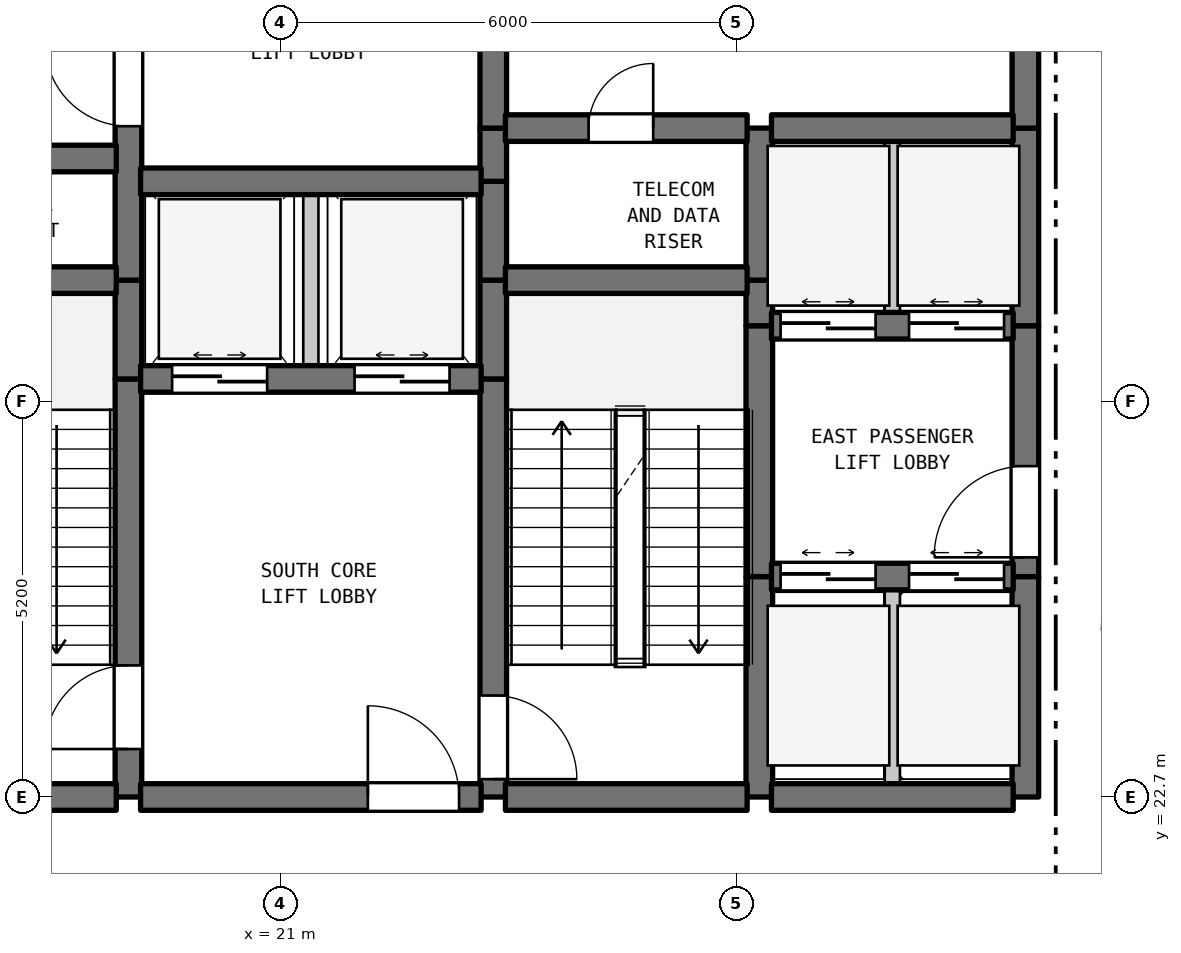
"""IFC4 building model, lengths in metres.
Left out: names, types, materials, properties, quantities, classifications, styles, units other than length and angle.
Written with IfcOpenShell. Run it as: python <this file> out.ifc"""

import sys

from ifc_helpers import new_model, si_unit, direction, frame, frame_2d, origin, place, context, subcontext, project, spatial, rectangle, extrude, element, fill, save


model = new_model("IFC4")
c1 = context("Model", 3, precision=1e-05, world=origin(), true_north=direction((0.0, 1.0)))
c2 = subcontext(c1, "Body", "Model", "MODEL_VIEW")
j1 = project(units=[si_unit("LENGTHUNIT", "METRE"), si_unit("PLANEANGLEUNIT", "RADIAN")], contexts=[c1])
p1 = place(None, origin())
s1 = spatial("IfcSite", under=j1, at=p1, CompositionType="ELEMENT")
p2 = place(p1, origin())
s2 = spatial("IfcBuilding", under=s1, at=p2, CompositionType="ELEMENT")
p3 = place(p2, frame((0.0, 0.0, 159.4)))
s3 = spatial("IfcBuildingStorey", under=s2, at=p3, CompositionType="ELEMENT", Elevation=159.4)
p4 = place(p3, frame((19.0, 22.7, 0.0), z_axis=(0.0, 0.0, 1.0), x_axis=(0.0, 1.0, 0.0)))
e1 = element("IfcWall", 1, at=p4, inside=s3, PredefinedType="SHEAR", context=c2, shape_type="SweptSolid", body=[
    extrude(rectangle(XDim=5.5, YDim=0.35, at=frame_2d((2.75, 0.0))), origin(), (0.0, 0.0, 1.0), 4.89),
])
p5 = place(p4, frame((0.631, 0.0, 0.0)))
e2 = element("IfcOpeningElement", 2, at=p5, cuts=e1, PredefinedType="OPENING", context=c2, shape_type="SweptSolid", body=[
    extrude(rectangle(XDim=1.1, YDim=2.15, at=frame_2d((0.55, 1.075))), frame((0.0, 0.185, 0.0), z_axis=(0.0, -1.0, 0.0), x_axis=(1.0, 0.0, 0.0)), (0.0, 0.0, 1.0), 0.37),
])
p6 = place(p3, frame((19.0, 28.2, 0.0), z_axis=(0.0, 0.0, 1.0), x_axis=(0.0, 1.0, 0.0)))
e3 = element("IfcWall", 3, at=p6, inside=s3, PredefinedType="SHEAR", context=c2, shape_type="SweptSolid", body=[
    extrude(rectangle(XDim=1.3, YDim=0.35, at=frame_2d((0.65, 0.0))), origin(), (0.0, 0.0, 1.0), 4.89),
])
p7 = place(p3, frame((19.0, 29.5, 0.0), z_axis=(0.0, 0.0, 1.0), x_axis=(0.0, 1.0, 0.0)))
e4 = element("IfcWall", 4, at=p7, inside=s3, PredefinedType="SHEAR", context=c2, shape_type="SweptSolid", body=[
    extrude(rectangle(XDim=5.5, YDim=0.35, at=frame_2d((2.75, 0.0))), origin(), (0.0, 0.0, 1.0), 4.89),
])
p8 = place(p7, frame((2.025, 0.0, 0.0)))
e5 = element("IfcOpeningElement", 5, at=p8, cuts=e4, PredefinedType="OPENING", context=c2, shape_type="SweptSolid", body=[
    extrude(rectangle(XDim=1.1, YDim=2.15, at=frame_2d((0.55, 1.075))), frame((0.0, 0.185, 0.0), z_axis=(0.0, -1.0, 0.0), x_axis=(1.0, 0.0, 0.0)), (0.0, 0.0, 1.0), 0.37),
])
p9 = place(p3, frame((21.4, 28.2, 0.0), z_axis=(0.0, 0.0, 1.0), x_axis=(0.0, 1.0, 0.0)))
e6 = element("IfcWall", 6, at=p9, inside=s3, PredefinedType="STANDARD", context=c2, shape_type="SweptSolid", body=[
    extrude(rectangle(XDim=2.6, YDim=0.2, at=frame_2d((1.3, 0.0))), origin(), (0.0, 0.0, 1.0), 4.89),
])
p10 = place(p3, frame((23.8, 22.7, 0.0), z_axis=(0.0, 0.0, 1.0), x_axis=(0.0, 1.0, 0.0)))
e7 = element("IfcWall", 7, at=p10, inside=s3, PredefinedType="SHEAR", context=c2, shape_type="SweptSolid", body=[
    extrude(rectangle(XDim=5.5, YDim=0.35, at=frame_2d((2.75, 0.0))), origin(), (0.0, 0.0, 1.0), 4.89),
])
p11 = place(p10, frame((0.235, 0.0, 0.0)))
e8 = element("IfcOpeningElement", 8, at=p11, cuts=e7, PredefinedType="OPENING", context=c2, shape_type="SweptSolid", body=[
    extrude(rectangle(XDim=1.1, YDim=2.15, at=frame_2d((0.55, 1.075))), frame((0.0, 0.185, 0.0), z_axis=(0.0, -1.0, 0.0), x_axis=(1.0, 0.0, 0.0)), (0.0, 0.0, 1.0), 0.37),
])
for number, where, z_axis, x_axis in (
    (9, (23.8, 28.2, 0.0), (0.0, 0.0, 1.0), (0.0, 1.0, 0.0)),
    (10, (23.8, 29.5, 0.0), (0.0, 0.0, 1.0), (0.0, 1.0, 0.0)),
):
    element("IfcWall", number, at=place(p3, frame(where, z_axis=z_axis, x_axis=x_axis)), inside=s3, PredefinedType="SHEAR", context=c2, shape_type="SweptSolid", body=[
        extrude(rectangle(XDim=1.3, YDim=0.35, at=frame_2d((0.65, 0.0))), origin(), (0.0, 0.0, 1.0), 4.89),
    ])
p12 = place(p3, frame((23.8, 30.8, 0.0), z_axis=(0.0, 0.0, 1.0), x_axis=(0.0, 1.0, 0.0)))
e11 = element("IfcWall", 11, at=p12, inside=s3, PredefinedType="SHEAR", context=c2, shape_type="SweptSolid", body=[
    extrude(rectangle(XDim=0.7, YDim=0.35, at=frame_2d((0.35, 0.0))), origin(), (0.0, 0.0, 1.0), 4.89),
])
p13 = place(p3, frame((23.8, 31.5, 0.0), z_axis=(0.0, 0.0, 1.0), x_axis=(0.0, 1.0, 0.0)))
e12 = element("IfcWall", 12, at=p13, inside=s3, PredefinedType="SHEAR", context=c2, shape_type="SweptSolid", body=[
    extrude(rectangle(XDim=3.5, YDim=0.35, at=frame_2d((1.75, 0.0))), origin(), (0.0, 0.0, 1.0), 4.89),
])
p14 = place(p13, frame((1.127, 0.0, 0.0)))
e13 = element("IfcOpeningElement", 13, at=p14, cuts=e12, PredefinedType="OPENING", context=c2, shape_type="SweptSolid", body=[
    extrude(rectangle(XDim=1.1, YDim=2.15, at=frame_2d((0.55, 1.075))), frame((0.0, 0.185, 0.0), z_axis=(0.0, -1.0, 0.0), x_axis=(1.0, 0.0, 0.0)), (0.0, 0.0, 1.0), 0.37),
])
p15 = place(p3, frame((27.3, 22.7, 0.0), z_axis=(0.0, 0.0, 1.0), x_axis=(0.0, 1.0, 0.0)))
e14 = element("IfcWall", 14, at=p15, inside=s3, PredefinedType="SHEAR", context=c2, shape_type="SweptSolid", body=[
    extrude(rectangle(XDim=2.9, YDim=0.35, at=frame_2d((1.45, 0.0))), origin(), (0.0, 0.0, 1.0), 4.89),
])
p16 = place(p3, frame((27.3, 25.6, 0.0), z_axis=(0.0, 0.0, 1.0), x_axis=(0.0, 1.0, 0.0)))
e15 = element("IfcWall", 15, at=p16, inside=s3, PredefinedType="SHEAR", context=c2, shape_type="SweptSolid", body=[
    extrude(rectangle(XDim=3.3, YDim=0.35, at=frame_2d((1.65, 0.0))), origin(), (0.0, 0.0, 1.0), 4.89),
])
p17 = place(p3, frame((27.3, 28.9, 0.0), z_axis=(0.0, 0.0, 1.0), x_axis=(0.0, 1.0, 0.0)))
e16 = element("IfcWall", 16, at=p17, inside=s3, PredefinedType="SHEAR", context=c2, shape_type="SweptSolid", body=[
    extrude(rectangle(XDim=0.6, YDim=0.35, at=frame_2d((0.3, 0.0))), origin(), (0.0, 0.0, 1.0), 4.89),
])
p18 = place(p3, frame((27.3, 29.5, 0.0), z_axis=(0.0, 0.0, 1.0), x_axis=(0.0, 1.0, 0.0)))
e17 = element("IfcWall", 17, at=p18, inside=s3, PredefinedType="SHEAR", context=c2, shape_type="SweptSolid", body=[
    extrude(rectangle(XDim=2.0, YDim=0.35, at=frame_2d((1.0, 0.0))), origin(), (0.0, 0.0, 1.0), 4.89),
])
p19 = place(p3, frame((29.05, 22.7, 0.0), z_axis=(0.0, 0.0, 1.0), x_axis=(0.0, 1.0, 0.0)))
e18 = element("IfcWall", 18, at=p19, inside=s3, PredefinedType="STANDARD", context=c2, shape_type="SweptSolid", body=[
    extrude(rectangle(XDim=2.9, YDim=0.2, at=frame_2d((1.45, 0.0))), origin(), (0.0, 0.0, 1.0), 4.89),
])
p20 = place(p3, frame((29.05, 28.9, 0.0), z_axis=(0.0, 0.0, 1.0), x_axis=(0.0, 1.0, 0.0)))
e19 = element("IfcWall", 19, at=p20, inside=s3, PredefinedType="STANDARD", context=c2, shape_type="SweptSolid", body=[
    extrude(rectangle(XDim=2.6, YDim=0.2, at=frame_2d((1.3, 0.0))), origin(), (0.0, 0.0, 1.0), 4.89),
])
p21 = place(p3, frame((30.8, 22.7, 0.0), z_axis=(0.0, 0.0, 1.0), x_axis=(0.0, 1.0, 0.0)))
e20 = element("IfcWall", 20, at=p21, inside=s3, PredefinedType="SHEAR", context=c2, shape_type="SweptSolid", body=[
    extrude(rectangle(XDim=2.9, YDim=0.35, at=frame_2d((1.45, 0.0))), origin(), (0.0, 0.0, 1.0), 4.89),
])
p22 = place(p3, frame((30.8, 25.6, 0.0), z_axis=(0.0, 0.0, 1.0), x_axis=(0.0, 1.0, 0.0)))
e21 = element("IfcWall", 21, at=p22, inside=s3, PredefinedType="SHEAR", context=c2, shape_type="SweptSolid", body=[
    extrude(rectangle(XDim=3.3, YDim=0.35, at=frame_2d((1.65, 0.0))), origin(), (0.0, 0.0, 1.0), 4.89),
])
p23 = place(p22, frame((0.253, 0.0, 0.0)))
e22 = element("IfcOpeningElement", 22, at=p23, cuts=e21, PredefinedType="OPENING", context=c2, shape_type="SweptSolid", body=[
    extrude(rectangle(XDim=1.2, YDim=2.2, at=frame_2d((0.6, 1.1))), frame((0.0, 0.185, 0.0), z_axis=(0.0, -1.0, 0.0), x_axis=(1.0, 0.0, 0.0)), (0.0, 0.0, 1.0), 0.37),
])
p24 = place(p3, frame((30.8, 28.9, 0.0), z_axis=(0.0, 0.0, 1.0), x_axis=(0.0, 1.0, 0.0)))
e23 = element("IfcWall", 23, at=p24, inside=s3, PredefinedType="SHEAR", context=c2, shape_type="SweptSolid", body=[
    extrude(rectangle(XDim=2.6, YDim=0.35, at=frame_2d((1.3, 0.0))), origin(), (0.0, 0.0, 1.0), 4.89),
])
p25 = place(p3, frame((30.8, 31.5, 0.0), z_axis=(0.0, 0.0, 1.0), x_axis=(0.0, 1.0, 0.0)))
e24 = element("IfcWall", 24, at=p25, inside=s3, PredefinedType="SHEAR", context=c2, shape_type="SweptSolid", body=[
    extrude(rectangle(XDim=3.5, YDim=0.35, at=frame_2d((1.75, 0.0))), origin(), (0.0, 0.0, 1.0), 4.89),
])
p26 = place(p25, frame((1.15, 0.0, 0.0)))
e25 = element("IfcOpeningElement", 25, at=p26, cuts=e24, PredefinedType="OPENING", context=c2, shape_type="SweptSolid", body=[
    extrude(rectangle(XDim=1.2, YDim=2.2, at=frame_2d((0.6, 1.1))), frame((0.0, 0.185, 0.0), z_axis=(0.0, -1.0, 0.0), x_axis=(1.0, 0.0, 0.0)), (0.0, 0.0, 1.0), 0.37),
])
p27 = place(p3, frame((15.16, 22.7, 0.0), z_axis=(0.0, 0.0, 1.0), x_axis=(1.0, 0.0, 0.0)))
e26 = element("IfcWall", 26, at=p27, inside=s3, PredefinedType="SHEAR", context=c2, shape_type="SweptSolid", body=[
    extrude(rectangle(XDim=3.68, YDim=0.35, at=frame_2d((1.84, 0.0))), origin(), (0.0, 0.0, 1.0), 4.89),
])
p28 = place(p3, frame((19.16, 22.7, 0.0), z_axis=(0.0, 0.0, 1.0), x_axis=(1.0, 0.0, 0.0)))
e27 = element("IfcWall", 27, at=p28, inside=s3, PredefinedType="SHEAR", context=c2, shape_type="SweptSolid", body=[
    extrude(rectangle(XDim=4.48, YDim=0.35, at=frame_2d((2.24, 0.0))), origin(), (0.0, 0.0, 1.0), 4.89),
])
p29 = place(p28, frame((2.99, 0.0, 0.0)))
e28 = element("IfcOpeningElement", 28, at=p29, cuts=e27, PredefinedType="OPENING", context=c2, shape_type="SweptSolid", body=[
    extrude(rectangle(XDim=1.2, YDim=2.2, at=frame_2d((0.6, 1.1))), frame((0.0, 0.185, 0.0), z_axis=(0.0, -1.0, 0.0), x_axis=(1.0, 0.0, 0.0)), (0.0, 0.0, 1.0), 0.37),
])
for number, where, z_axis, x_axis in (
    (29, (23.96, 22.7, 0.0), (0.0, 0.0, 1.0), (1.0, 0.0, 0.0)),
    (30, (27.46, 22.7, 0.0), (0.0, 0.0, 1.0), (1.0, 0.0, 0.0)),
):
    element("IfcWall", number, at=place(p3, frame(where, z_axis=z_axis, x_axis=x_axis)), inside=s3, PredefinedType="SHEAR", context=c2, shape_type="SweptSolid", body=[
        extrude(rectangle(XDim=3.18, YDim=0.35, at=frame_2d((1.59, 0.0))), origin(), (0.0, 0.0, 1.0), 4.89),
    ])
p30 = place(p3, frame((27.46, 25.6, 0.0), z_axis=(0.0, 0.0, 1.0), x_axis=(1.0, 0.0, 0.0)))
e31 = element("IfcWall", 31, at=p30, inside=s3, PredefinedType="SHEAR", context=c2, shape_type="SweptSolid", body=[
    extrude(rectangle(XDim=3.18, YDim=0.35, at=frame_2d((1.59, 0.0))), origin(), (0.0, 0.0, 1.0), 4.89),
])
p31 = place(p30, frame((0.12, 0.0, 0.0)))
e32 = element("IfcOpeningElement", 32, at=p31, cuts=e31, PredefinedType="OPENING", context=c2, shape_type="SweptSolid", body=[
    extrude(rectangle(XDim=1.25, YDim=2.2, at=frame_2d((0.625, 1.1))), frame((0.0, 0.185, 0.0), z_axis=(0.0, -1.0, 0.0), x_axis=(1.0, 0.0, 0.0)), (0.0, 0.0, 1.0), 0.37),
])
p32 = place(p30, frame((1.81, 0.0, 0.0)))
e33 = element("IfcOpeningElement", 33, at=p32, cuts=e31, PredefinedType="OPENING", context=c2, shape_type="SweptSolid", body=[
    extrude(rectangle(XDim=1.25, YDim=2.2, at=frame_2d((0.625, 1.1))), frame((0.0, 0.185, 0.0), z_axis=(0.0, -1.0, 0.0), x_axis=(1.0, 0.0, 0.0)), (0.0, 0.0, 1.0), 0.37),
])
p33 = place(p3, frame((19.16, 28.2, 0.0), z_axis=(0.0, 0.0, 1.0), x_axis=(1.0, 0.0, 0.0)))
e34 = element("IfcWall", 34, at=p33, inside=s3, PredefinedType="SHEAR", context=c2, shape_type="SweptSolid", body=[
    extrude(rectangle(XDim=4.48, YDim=0.35, at=frame_2d((2.24, 0.0))), origin(), (0.0, 0.0, 1.0), 4.89),
])
p34 = place(p33, frame((0.415, 0.0, 0.0)))
e35 = element("IfcOpeningElement", 35, at=p34, cuts=e34, PredefinedType="OPENING", context=c2, shape_type="SweptSolid", body=[
    extrude(rectangle(XDim=1.25, YDim=2.2, at=frame_2d((0.625, 1.1))), frame((0.0, 0.185, 0.0), z_axis=(0.0, -1.0, 0.0), x_axis=(1.0, 0.0, 0.0)), (0.0, 0.0, 1.0), 0.37),
])
p35 = place(p33, frame((2.815, 0.0, 0.0)))
e36 = element("IfcOpeningElement", 36, at=p35, cuts=e34, PredefinedType="OPENING", context=c2, shape_type="SweptSolid", body=[
    extrude(rectangle(XDim=1.25, YDim=2.2, at=frame_2d((0.625, 1.1))), frame((0.0, 0.185, 0.0), z_axis=(0.0, -1.0, 0.0), x_axis=(1.0, 0.0, 0.0)), (0.0, 0.0, 1.0), 0.37),
])
p36 = place(p3, frame((27.46, 28.9, 0.0), z_axis=(0.0, 0.0, 1.0), x_axis=(1.0, 0.0, 0.0)))
e37 = element("IfcWall", 37, at=p36, inside=s3, PredefinedType="SHEAR", context=c2, shape_type="SweptSolid", body=[
    extrude(rectangle(XDim=3.18, YDim=0.35, at=frame_2d((1.59, 0.0))), origin(), (0.0, 0.0, 1.0), 4.89),
])
p37 = place(p36, frame((0.12, 0.0, 0.0)))
e38 = element("IfcOpeningElement", 38, at=p37, cuts=e37, PredefinedType="OPENING", context=c2, shape_type="SweptSolid", body=[
    extrude(rectangle(XDim=1.25, YDim=2.2, at=frame_2d((0.625, 1.1))), frame((0.0, 0.185, 0.0), z_axis=(0.0, -1.0, 0.0), x_axis=(1.0, 0.0, 0.0)), (0.0, 0.0, 1.0), 0.37),
])
p38 = place(p36, frame((1.81, 0.0, 0.0)))
e39 = element("IfcOpeningElement", 39, at=p38, cuts=e37, PredefinedType="OPENING", context=c2, shape_type="SweptSolid", body=[
    extrude(rectangle(XDim=1.25, YDim=2.2, at=frame_2d((0.625, 1.1))), frame((0.0, 0.185, 0.0), z_axis=(0.0, -1.0, 0.0), x_axis=(1.0, 0.0, 0.0)), (0.0, 0.0, 1.0), 0.37),
])
p39 = place(p3, frame((15.16, 29.5, 0.0), z_axis=(0.0, 0.0, 1.0), x_axis=(1.0, 0.0, 0.0)))
e40 = element("IfcWall", 40, at=p39, inside=s3, PredefinedType="SHEAR", context=c2, shape_type="SweptSolid", body=[
    extrude(rectangle(XDim=3.68, YDim=0.35, at=frame_2d((1.84, 0.0))), origin(), (0.0, 0.0, 1.0), 4.89),
])
p40 = place(p3, frame((23.96, 29.5, 0.0), z_axis=(0.0, 0.0, 1.0), x_axis=(1.0, 0.0, 0.0)))
e41 = element("IfcWall", 41, at=p40, inside=s3, PredefinedType="SHEAR", context=c2, shape_type="SweptSolid", body=[
    extrude(rectangle(XDim=3.18, YDim=0.35, at=frame_2d((1.59, 0.0))), origin(), (0.0, 0.0, 1.0), 4.89),
])
p41 = place(p3, frame((19.16, 30.8, 0.0), z_axis=(0.0, 0.0, 1.0), x_axis=(1.0, 0.0, 0.0)))
e42 = element("IfcWall", 42, at=p41, inside=s3, PredefinedType="SHEAR", context=c2, shape_type="SweptSolid", body=[
    extrude(rectangle(XDim=4.48, YDim=0.35, at=frame_2d((2.24, 0.0))), origin(), (0.0, 0.0, 1.0), 4.89),
])
p42 = place(p3, frame((15.16, 31.1, 0.0), z_axis=(0.0, 0.0, 1.0), x_axis=(1.0, 0.0, 0.0)))
e43 = element("IfcWall", 43, at=p42, inside=s3, PredefinedType="SHEAR", context=c2, shape_type="SweptSolid", body=[
    extrude(rectangle(XDim=3.68, YDim=0.35, at=frame_2d((1.84, 0.0))), origin(), (0.0, 0.0, 1.0), 4.89),
])
p43 = place(p3, frame((23.96, 31.5, 0.0), z_axis=(0.0, 0.0, 1.0), x_axis=(1.0, 0.0, 0.0)))
e44 = element("IfcWall", 44, at=p43, inside=s3, PredefinedType="SHEAR", context=c2, shape_type="SweptSolid", body=[
    extrude(rectangle(XDim=3.18, YDim=0.35, at=frame_2d((1.59, 0.0))), origin(), (0.0, 0.0, 1.0), 4.89),
])
p44 = place(p43, frame((1.094, 0.0, 0.0)))
e45 = element("IfcOpeningElement", 45, at=p44, cuts=e44, PredefinedType="OPENING", context=c2, shape_type="SweptSolid", body=[
    extrude(rectangle(XDim=0.85, YDim=2.1, at=frame_2d((0.425, 1.05))), frame((0.0, 0.185, 0.0), z_axis=(0.0, -1.0, 0.0), x_axis=(1.0, 0.0, 0.0)), (0.0, 0.0, 1.0), 0.37),
])
p45 = place(p3, frame((27.46, 31.5, 0.0), z_axis=(0.0, 0.0, 1.0), x_axis=(1.0, 0.0, 0.0)))
e46 = element("IfcWall", 46, at=p45, inside=s3, PredefinedType="SHEAR", context=c2, shape_type="SweptSolid", body=[
    extrude(rectangle(XDim=3.18, YDim=0.35, at=frame_2d((1.59, 0.0))), origin(), (0.0, 0.0, 1.0), 4.89),
])
p46 = place(p5, origin())
e47 = element("IfcDoor", 47, at=p46, inside=s3, OperationType="SINGLE_SWING_LEFT", PredefinedType="DOOR", context=c2, shape_type="SweptSolid", body=[
    extrude(rectangle(XDim=1.1, YDim=2.15, at=frame_2d((0.55, 1.075))), frame((0.0, 0.025, 0.0), z_axis=(0.0, -1.0, 0.0), x_axis=(1.0, 0.0, 0.0)), (0.0, 0.0, 1.0), 0.05),
])
fill(e2, e47)
p47 = place(p8, origin())
e48 = element("IfcDoor", 48, at=p47, inside=s3, OperationType="SINGLE_SWING_RIGHT", PredefinedType="DOOR", context=c2, shape_type="SweptSolid", body=[
    extrude(rectangle(XDim=1.1, YDim=2.15, at=frame_2d((0.55, 1.075))), frame((0.0, 0.025, 0.0), z_axis=(0.0, -1.0, 0.0), x_axis=(1.0, 0.0, 0.0)), (0.0, 0.0, 1.0), 0.05),
])
fill(e5, e48)
p48 = place(p11, frame((1.1, 0.0, 0.0), z_axis=(0.0, 0.0, 1.0), x_axis=(-1.0, 0.0, 0.0)))
e49 = element("IfcDoor", 49, at=p48, inside=s3, OperationType="SINGLE_SWING_LEFT", PredefinedType="DOOR", context=c2, shape_type="SweptSolid", body=[
    extrude(rectangle(XDim=1.1, YDim=2.15, at=frame_2d((0.55, 1.075))), frame((0.0, 0.025, 0.0), z_axis=(0.0, -1.0, 0.0), x_axis=(1.0, 0.0, 0.0)), (0.0, 0.0, 1.0), 0.05),
])
fill(e8, e49)
p49 = place(p23, origin())
e50 = element("IfcDoor", 50, at=p49, inside=s3, OperationType="SINGLE_SWING_LEFT", PredefinedType="DOOR", context=c2, shape_type="SweptSolid", body=[
    extrude(rectangle(XDim=1.2, YDim=2.2, at=frame_2d((0.6, 1.1))), frame((0.0, 0.025, 0.0), z_axis=(0.0, -1.0, 0.0), x_axis=(1.0, 0.0, 0.0)), (0.0, 0.0, 1.0), 0.05),
])
fill(e22, e50)
p50 = place(p29, origin())
e51 = element("IfcDoor", 51, at=p50, inside=s3, OperationType="SINGLE_SWING_LEFT", PredefinedType="DOOR", context=c2, shape_type="SweptSolid", body=[
    extrude(rectangle(XDim=1.2, YDim=2.2, at=frame_2d((0.6, 1.1))), frame((0.0, 0.025, 0.0), z_axis=(0.0, -1.0, 0.0), x_axis=(1.0, 0.0, 0.0)), (0.0, 0.0, 1.0), 0.05),
])
fill(e28, e51)
p51 = place(p31, origin())
e52 = element("IfcDoor", 52, at=p51, inside=s3, OperationType="DOUBLE_DOOR_SLIDING", PredefinedType="DOOR", context=c2, shape_type="SweptSolid", body=[
    extrude(rectangle(XDim=1.25, YDim=2.2, at=frame_2d((0.625, 1.1))), frame((0.0, 0.025, 0.0), z_axis=(0.0, -1.0, 0.0), x_axis=(1.0, 0.0, 0.0)), (0.0, 0.0, 1.0), 0.05),
])
fill(e32, e52)
p52 = place(p32, origin())
e53 = element("IfcDoor", 53, at=p52, inside=s3, OperationType="DOUBLE_DOOR_SLIDING", PredefinedType="DOOR", context=c2, shape_type="SweptSolid", body=[
    extrude(rectangle(XDim=1.25, YDim=2.2, at=frame_2d((0.625, 1.1))), frame((0.0, 0.025, 0.0), z_axis=(0.0, -1.0, 0.0), x_axis=(1.0, 0.0, 0.0)), (0.0, 0.0, 1.0), 0.05),
])
fill(e33, e53)
p53 = place(p34, origin())
e54 = element("IfcDoor", 54, at=p53, inside=s3, OperationType="DOUBLE_DOOR_SLIDING", PredefinedType="DOOR", context=c2, shape_type="SweptSolid", body=[
    extrude(rectangle(XDim=1.25, YDim=2.2, at=frame_2d((0.625, 1.1))), frame((0.0, 0.025, 0.0), z_axis=(0.0, -1.0, 0.0), x_axis=(1.0, 0.0, 0.0)), (0.0, 0.0, 1.0), 0.05),
])
fill(e35, e54)
p54 = place(p35, origin())
e55 = element("IfcDoor", 55, at=p54, inside=s3, OperationType="DOUBLE_DOOR_SLIDING", PredefinedType="DOOR", context=c2, shape_type="SweptSolid", body=[
    extrude(rectangle(XDim=1.25, YDim=2.2, at=frame_2d((0.625, 1.1))), frame((0.0, 0.025, 0.0), z_axis=(0.0, -1.0, 0.0), x_axis=(1.0, 0.0, 0.0)), (0.0, 0.0, 1.0), 0.05),
])
fill(e36, e55)
p55 = place(p37, origin())
e56 = element("IfcDoor", 56, at=p55, inside=s3, OperationType="DOUBLE_DOOR_SLIDING", PredefinedType="DOOR", context=c2, shape_type="SweptSolid", body=[
    extrude(rectangle(XDim=1.25, YDim=2.2, at=frame_2d((0.625, 1.1))), frame((0.0, 0.025, 0.0), z_axis=(0.0, -1.0, 0.0), x_axis=(1.0, 0.0, 0.0)), (0.0, 0.0, 1.0), 0.05),
])
fill(e38, e56)
p56 = place(p38, origin())
e57 = element("IfcDoor", 57, at=p56, inside=s3, OperationType="DOUBLE_DOOR_SLIDING", PredefinedType="DOOR", context=c2, shape_type="SweptSolid", body=[
    extrude(rectangle(XDim=1.25, YDim=2.2, at=frame_2d((0.625, 1.1))), frame((0.0, 0.025, 0.0), z_axis=(0.0, -1.0, 0.0), x_axis=(1.0, 0.0, 0.0)), (0.0, 0.0, 1.0), 0.05),
])
fill(e39, e57)
p57 = place(p44, origin())
e58 = element("IfcDoor", 58, at=p57, inside=s3, OperationType="SINGLE_SWING_RIGHT", PredefinedType="DOOR", context=c2, shape_type="SweptSolid", body=[
    extrude(rectangle(XDim=0.85, YDim=2.1, at=frame_2d((0.425, 1.05))), frame((0.0, 0.025, 0.0), z_axis=(0.0, -1.0, 0.0), x_axis=(1.0, 0.0, 0.0)), (0.0, 0.0, 1.0), 0.05),
])
fill(e45, e58)
save(model, sys.argv[1])
